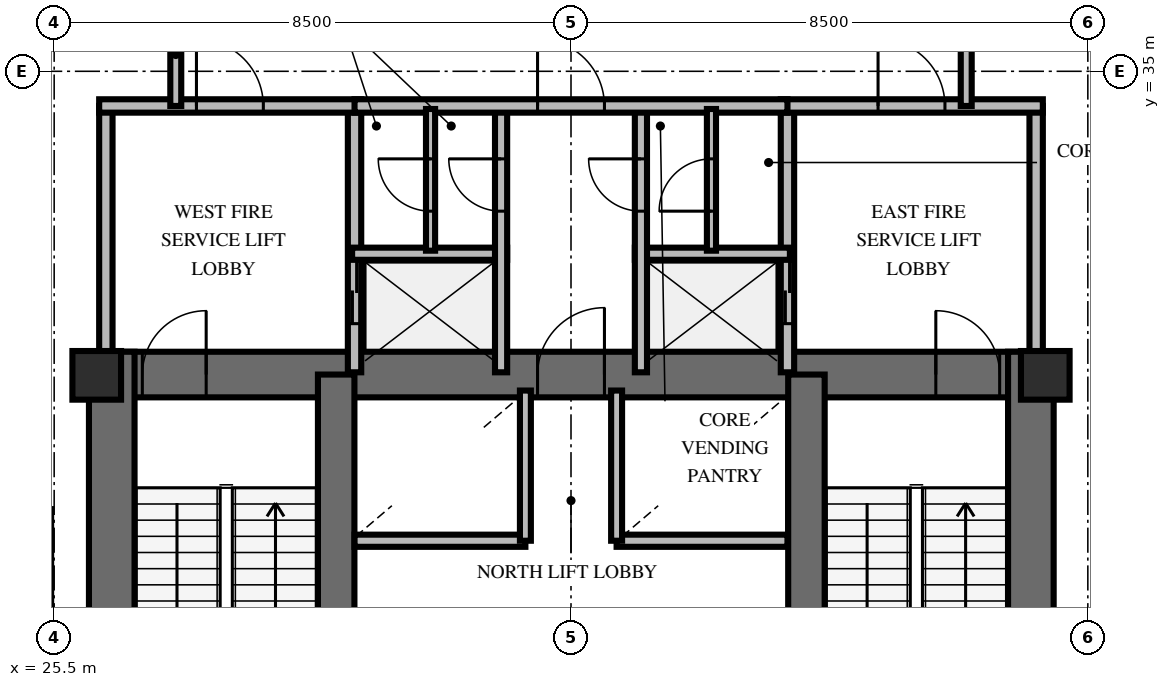
"""IFC4 building model, lengths in metres.
Left out: names, types, materials, properties, quantities, classifications, styles, units other than length and angle.
Written with IfcOpenShell. Run it as: python <this file> out.ifc"""

import sys

from ifc_helpers import new_model, si_unit, direction, frame, frame_2d, origin, origin_2d, place, context, subcontext, project, spatial, rectangle, extrude, element, fill, save


model = new_model("IFC4")
c1 = context("Model", 3, precision=1e-05, world=origin(), true_north=direction((0.0, 1.0)))
c2 = subcontext(c1, "Body", "Model", "MODEL_VIEW")
j1 = project(units=[si_unit("LENGTHUNIT", "METRE"), si_unit("PLANEANGLEUNIT", "RADIAN")], contexts=[c1])
p1 = place(None, origin())
s1 = spatial("IfcSite", under=j1, at=p1, CompositionType="ELEMENT")
p2 = place(p1, origin())
s2 = spatial("IfcBuilding", under=s1, at=p2, CompositionType="ELEMENT")
p3 = place(p2, frame((0.0, 0.0, 121.8)))
s3 = spatial("IfcBuildingStorey", under=s2, at=p3, CompositionType="ELEMENT", Elevation=121.8)
p4 = place(p3, frame((26.072, 30.013, 0.0), z_axis=(0.0, 0.0, 1.0), x_axis=(1.0, 0.0, 0.0)))
e1 = element("IfcWall", 1, at=p4, inside=s3, PredefinedType="SHEAR", context=c2, shape_type="SweptSolid", body=[
    extrude(rectangle(XDim=15.866, YDim=0.75, at=frame_2d((7.933, 0.0))), origin(), (0.0, 0.0, 1.0), 4.0),
])
p5 = place(p4, frame((0.878, 0.0, 0.0)))
e2 = element("IfcOpeningElement", 2, at=p5, cuts=e1, PredefinedType="OPENING", context=c2, shape_type="SweptSolid", body=[
    extrude(rectangle(XDim=1.05, YDim=2.15, at=frame_2d((0.525, 1.075))), frame((0.0, 0.385, 0.0), z_axis=(0.0, -1.0, 0.0), x_axis=(1.0, 0.0, 0.0)), (0.0, 0.0, 1.0), 0.77),
])
p6 = place(p4, frame((13.928, 0.0, 0.0)))
e3 = element("IfcOpeningElement", 3, at=p6, cuts=e1, PredefinedType="OPENING", context=c2, shape_type="SweptSolid", body=[
    extrude(rectangle(XDim=1.05, YDim=2.15, at=frame_2d((0.525, 1.075))), frame((0.0, 0.385, 0.0), z_axis=(0.0, -1.0, 0.0), x_axis=(1.0, 0.0, 0.0)), (0.0, 0.0, 1.0), 0.77),
])
p7 = place(p4, frame((7.378, 0.0, 0.0)))
e4 = element("IfcOpeningElement", 4, at=p7, cuts=e1, PredefinedType="OPENING", context=c2, shape_type="SweptSolid", body=[
    extrude(rectangle(XDim=1.1, YDim=2.15, at=frame_2d((0.55, 1.075))), frame((0.0, 0.385, 0.0), z_axis=(0.0, -1.0, 0.0), x_axis=(1.0, 0.0, 0.0)), (0.0, 0.0, 1.0), 0.77),
])
for number, where, z_axis, x_axis in (
    (5, (26.447, 19.812, 0.0), (0.0, 0.0, 1.0), (0.0, 1.0, 0.0)),
    (6, (41.563, 19.812, 0.0), (0.0, 0.0, 1.0), (0.0, 1.0, 0.0)),
):
    element("IfcWall", number, at=place(p3, frame(where, z_axis=z_axis, x_axis=x_axis)), inside=s3, PredefinedType="SHEAR", context=c2, shape_type="SweptSolid", body=[
        extrude(rectangle(XDim=10.576, YDim=0.75, at=frame_2d((5.288, 0.0))), origin(), (0.0, 0.0, 1.0), 4.0),
    ])
for number, where, z_axis, x_axis in (
    (7, (30.138, 20.187, 0.0), (0.0, 0.0, 1.0), (0.0, 1.0, 0.0)),
    (8, (37.872, 20.187, 0.0), (0.0, 0.0, 1.0), (0.0, 1.0, 0.0)),
):
    element("IfcWall", number, at=place(p3, frame(where, z_axis=z_axis, x_axis=x_axis)), inside=s3, PredefinedType="SHEAR", context=c2, shape_type="SweptSolid", body=[
        extrude(rectangle(XDim=9.826, YDim=0.6, at=frame_2d((4.913, 0.0))), origin(), (0.0, 0.0, 1.0), 4.0),
    ])
for number, where, z_axis, x_axis in (
    (9, (26.2, 30.0, 0.0), (0.0, 0.0, 1.0), (1.0, 0.0, 0.0)),
    (10, (41.8, 30.0, 0.0), (0.0, 0.0, 1.0), (1.0, 0.0, 0.0)),
):
    element("IfcColumn", number, at=place(p3, frame(where, z_axis=z_axis, x_axis=x_axis)), inside=s3, PredefinedType="PILASTER", context=c2, shape_type="SweptSolid", body=[
        extrude(rectangle(XDim=0.8, YDim=0.8, at=origin_2d()), origin(), (0.0, 0.0, 1.0), 4.0),
    ])
p8 = place(p3, frame((26.35, 30.05, 0.0), z_axis=(0.0, 0.0, 1.0), x_axis=(0.0, 1.0, 0.0)))
e11 = element("IfcWall", 11, at=p8, inside=s3, PredefinedType="SOLIDWALL", context=c2, shape_type="SweptSolid", body=[
    extrude(rectangle(XDim=4.38, YDim=0.22, at=frame_2d((2.19, 0.0))), origin(), (0.0, 0.0, 1.0), 2.8),
])
p9 = place(p3, frame((30.44, 30.05, 0.0), z_axis=(0.0, 0.0, 1.0), x_axis=(0.0, 1.0, 0.0)))
e12 = element("IfcWall", 12, at=p9, inside=s3, PredefinedType="SOLIDWALL", context=c2, shape_type="SweptSolid", body=[
    extrude(rectangle(XDim=4.38, YDim=0.22, at=frame_2d((2.19, 0.0))), origin(), (0.0, 0.0, 1.0), 2.8),
])
p10 = place(p9, frame((0.8, 0.0, 0.0)))
e13 = element("IfcOpeningElement", 13, at=p10, cuts=e12, PredefinedType="OPENING", context=c2, shape_type="SweptSolid", body=[
    extrude(rectangle(XDim=1.05, YDim=2.1, at=frame_2d((0.525, 1.05))), frame((0.0, 0.12, 0.0), z_axis=(0.0, -1.0, 0.0), x_axis=(1.0, 0.0, 0.0)), (0.0, 0.0, 1.0), 0.24),
])
p11 = place(p3, frame((26.24, 34.43, 0.0), z_axis=(0.0, 0.0, 1.0), x_axis=(1.0, 0.0, 0.0)))
e14 = element("IfcWall", 14, at=p11, inside=s3, PredefinedType="SOLIDWALL", context=c2, shape_type="SweptSolid", body=[
    extrude(rectangle(XDim=4.31, YDim=0.22, at=frame_2d((2.155, 0.0))), origin(), (0.0, 0.0, 1.0), 2.8),
])
p12 = place(p11, frame((1.6, 0.0, 0.0)))
e15 = element("IfcOpeningElement", 15, at=p12, cuts=e14, PredefinedType="OPENING", context=c2, shape_type="SweptSolid", body=[
    extrude(rectangle(XDim=1.1, YDim=2.15, at=frame_2d((0.55, 1.075))), frame((0.0, 0.12, 0.0), z_axis=(0.0, -1.0, 0.0), x_axis=(1.0, 0.0, 0.0)), (0.0, 0.0, 1.0), 0.24),
])
p13 = place(p3, frame((30.4, 32.0, 0.0), z_axis=(0.0, 0.0, 1.0), x_axis=(1.0, 0.0, 0.0)))
e16 = element("IfcWall", 16, at=p13, inside=s3, PredefinedType="SOLIDWALL", context=c2, shape_type="SweptSolid", body=[
    extrude(rectangle(XDim=2.55, YDim=0.2, at=frame_2d((1.275, 0.0))), origin(), (0.0, 0.0, 1.0), 2.8),
])
p14 = place(p3, frame((32.85, 30.05, 0.0), z_axis=(0.0, 0.0, 1.0), x_axis=(0.0, 1.0, 0.0)))
e17 = element("IfcWall", 17, at=p14, inside=s3, PredefinedType="SOLIDWALL", context=c2, shape_type="SweptSolid", body=[
    extrude(rectangle(XDim=4.38, YDim=0.2, at=frame_2d((2.19, 0.0))), origin(), (0.0, 0.0, 1.0), 2.8),
])
p15 = place(p14, frame((2.65, 0.0, 0.0)))
e18 = element("IfcOpeningElement", 18, at=p15, cuts=e17, PredefinedType="OPENING", context=c2, shape_type="SweptSolid", body=[
    extrude(rectangle(XDim=0.86, YDim=2.05, at=frame_2d((0.43, 1.025))), frame((0.0, 0.11, 0.0), z_axis=(0.0, -1.0, 0.0), x_axis=(1.0, 0.0, 0.0)), (0.0, 0.0, 1.0), 0.22),
])
p16 = place(p3, frame((37.56, 30.05, 0.0), z_axis=(0.0, 0.0, 1.0), x_axis=(0.0, 1.0, 0.0)))
e19 = element("IfcWall", 19, at=p16, inside=s3, PredefinedType="SOLIDWALL", context=c2, shape_type="SweptSolid", body=[
    extrude(rectangle(XDim=4.38, YDim=0.22, at=frame_2d((2.19, 0.0))), origin(), (0.0, 0.0, 1.0), 2.8),
])
p17 = place(p16, frame((0.8, 0.0, 0.0)))
e20 = element("IfcOpeningElement", 20, at=p17, cuts=e19, PredefinedType="OPENING", context=c2, shape_type="SweptSolid", body=[
    extrude(rectangle(XDim=1.05, YDim=2.1, at=frame_2d((0.525, 1.05))), frame((0.0, 0.12, 0.0), z_axis=(0.0, -1.0, 0.0), x_axis=(1.0, 0.0, 0.0)), (0.0, 0.0, 1.0), 0.24),
])
p18 = place(p3, frame((41.65, 30.05, 0.0), z_axis=(0.0, 0.0, 1.0), x_axis=(0.0, 1.0, 0.0)))
e21 = element("IfcWall", 21, at=p18, inside=s3, PredefinedType="SOLIDWALL", context=c2, shape_type="SweptSolid", body=[
    extrude(rectangle(XDim=4.38, YDim=0.22, at=frame_2d((2.19, 0.0))), origin(), (0.0, 0.0, 1.0), 2.8),
])
p19 = place(p3, frame((37.45, 34.43, 0.0), z_axis=(0.0, 0.0, 1.0), x_axis=(1.0, 0.0, 0.0)))
e22 = element("IfcWall", 22, at=p19, inside=s3, PredefinedType="SOLIDWALL", context=c2, shape_type="SweptSolid", body=[
    extrude(rectangle(XDim=4.31, YDim=0.22, at=frame_2d((2.155, 0.0))), origin(), (0.0, 0.0, 1.0), 2.8),
])
p20 = place(p19, frame((1.6, 0.0, 0.0)))
e23 = element("IfcOpeningElement", 23, at=p20, cuts=e22, PredefinedType="OPENING", context=c2, shape_type="SweptSolid", body=[
    extrude(rectangle(XDim=1.1, YDim=2.15, at=frame_2d((0.55, 1.075))), frame((0.0, 0.12, 0.0), z_axis=(0.0, -1.0, 0.0), x_axis=(1.0, 0.0, 0.0)), (0.0, 0.0, 1.0), 0.24),
])
p21 = place(p3, frame((35.05, 32.0, 0.0), z_axis=(0.0, 0.0, 1.0), x_axis=(1.0, 0.0, 0.0)))
e24 = element("IfcWall", 24, at=p21, inside=s3, PredefinedType="SOLIDWALL", context=c2, shape_type="SweptSolid", body=[
    extrude(rectangle(XDim=2.55, YDim=0.2, at=frame_2d((1.275, 0.0))), origin(), (0.0, 0.0, 1.0), 2.8),
])
p22 = place(p3, frame((35.15, 30.05, 0.0), z_axis=(0.0, 0.0, 1.0), x_axis=(0.0, 1.0, 0.0)))
e25 = element("IfcWall", 25, at=p22, inside=s3, PredefinedType="SOLIDWALL", context=c2, shape_type="SweptSolid", body=[
    extrude(rectangle(XDim=4.38, YDim=0.2, at=frame_2d((2.19, 0.0))), origin(), (0.0, 0.0, 1.0), 2.8),
])
p23 = place(p22, frame((2.65, 0.0, 0.0)))
e26 = element("IfcOpeningElement", 26, at=p23, cuts=e25, PredefinedType="OPENING", context=c2, shape_type="SweptSolid", body=[
    extrude(rectangle(XDim=0.86, YDim=2.05, at=frame_2d((0.43, 1.025))), frame((0.0, 0.11, 0.0), z_axis=(0.0, -1.0, 0.0), x_axis=(1.0, 0.0, 0.0)), (0.0, 0.0, 1.0), 0.22),
])
p24 = place(p3, frame((30.44, 34.43, 0.0), z_axis=(0.0, 0.0, 1.0), x_axis=(1.0, 0.0, 0.0)))
e27 = element("IfcWall", 27, at=p24, inside=s3, PredefinedType="SOLIDWALL", context=c2, shape_type="SweptSolid", body=[
    extrude(rectangle(XDim=7.12, YDim=0.22, at=frame_2d((3.56, 0.0))), origin(), (0.0, 0.0, 1.0), 2.8),
])
p25 = place(p24, frame((3.01, 0.0, 0.0)))
e28 = element("IfcOpeningElement", 28, at=p25, cuts=e27, PredefinedType="OPENING", context=c2, shape_type="SweptSolid", body=[
    extrude(rectangle(XDim=1.1, YDim=2.15, at=frame_2d((0.55, 1.075))), frame((0.0, 0.12, 0.0), z_axis=(0.0, -1.0, 0.0), x_axis=(1.0, 0.0, 0.0)), (0.0, 0.0, 1.0), 0.24),
])
p26 = place(p3, frame((31.69, 32.05, 0.0), z_axis=(0.0, 0.0, 1.0), x_axis=(0.0, 1.0, 0.0)))
e29 = element("IfcWall", 29, at=p26, inside=s3, PredefinedType="PARTITIONING", context=c2, shape_type="SweptSolid", body=[
    extrude(rectangle(XDim=2.33, YDim=0.15, at=frame_2d((1.165, 0.0))), origin(), (0.0, 0.0, 1.0), 2.8),
])
p27 = place(p26, frame((0.65, 0.0, 0.0)))
e30 = element("IfcOpeningElement", 30, at=p27, cuts=e29, PredefinedType="OPENING", context=c2, shape_type="SweptSolid", body=[
    extrude(rectangle(XDim=0.86, YDim=2.05, at=frame_2d((0.43, 1.025))), frame((0.0, 0.085, 0.0), z_axis=(0.0, -1.0, 0.0), x_axis=(1.0, 0.0, 0.0)), (0.0, 0.0, 1.0), 0.17),
])
p28 = place(p3, frame((36.31, 32.05, 0.0), z_axis=(0.0, 0.0, 1.0), x_axis=(0.0, 1.0, 0.0)))
e31 = element("IfcWall", 31, at=p28, inside=s3, PredefinedType="PARTITIONING", context=c2, shape_type="SweptSolid", body=[
    extrude(rectangle(XDim=2.33, YDim=0.15, at=frame_2d((1.165, 0.0))), origin(), (0.0, 0.0, 1.0), 2.8),
])
p29 = place(p28, frame((0.65, 0.0, 0.0)))
e32 = element("IfcOpeningElement", 32, at=p29, cuts=e31, PredefinedType="OPENING", context=c2, shape_type="SweptSolid", body=[
    extrude(rectangle(XDim=0.86, YDim=2.05, at=frame_2d((0.43, 1.025))), frame((0.0, 0.085, 0.0), z_axis=(0.0, -1.0, 0.0), x_axis=(1.0, 0.0, 0.0)), (0.0, 0.0, 1.0), 0.17),
])
p30 = place(p3, frame((30.44, 27.28, 0.0), z_axis=(0.0, 0.0, 1.0), x_axis=(1.0, 0.0, 0.0)))
e33 = element("IfcWall", 33, at=p30, inside=s3, PredefinedType="SOLIDWALL", context=c2, shape_type="SweptSolid", body=[
    extrude(rectangle(XDim=2.81, YDim=0.2, at=frame_2d((1.405, 0.0))), origin(), (0.0, 0.0, 1.0), 2.8),
])
p31 = place(p3, frame((33.25, 27.28, 0.0), z_axis=(0.0, 0.0, 1.0), x_axis=(0.0, 1.0, 0.0)))
e34 = element("IfcWall", 34, at=p31, inside=s3, PredefinedType="SOLIDWALL", context=c2, shape_type="SweptSolid", body=[
    extrude(rectangle(XDim=2.47, YDim=0.18, at=frame_2d((1.235, 0.0))), origin(), (0.0, 0.0, 1.0), 2.8),
])
p32 = place(p3, frame((34.75, 27.28, 0.0), z_axis=(0.0, 0.0, 1.0), x_axis=(1.0, 0.0, 0.0)))
e35 = element("IfcWall", 35, at=p32, inside=s3, PredefinedType="SOLIDWALL", context=c2, shape_type="SweptSolid", body=[
    extrude(rectangle(XDim=2.81, YDim=0.2, at=frame_2d((1.405, 0.0))), origin(), (0.0, 0.0, 1.0), 2.8),
])
p33 = place(p3, frame((34.75, 27.28, 0.0), z_axis=(0.0, 0.0, 1.0), x_axis=(0.0, 1.0, 0.0)))
e36 = element("IfcWall", 36, at=p33, inside=s3, PredefinedType="SOLIDWALL", context=c2, shape_type="SweptSolid", body=[
    extrude(rectangle(XDim=2.47, YDim=0.18, at=frame_2d((1.235, 0.0))), origin(), (0.0, 0.0, 1.0), 2.8),
])
for number, where, z_axis, x_axis in (
    (37, (27.5, 34.43, 0.0), (0.0, 0.0, 1.0), (0.0, 1.0, 0.0)),
    (38, (40.5, 36.123, 0.0), (0.0, 0.0, 1.0), (0.0, -1.0, 0.0)),
):
    element("IfcWall", number, at=place(p3, frame(where, z_axis=z_axis, x_axis=x_axis)), inside=s3, PredefinedType="PARTITIONING", context=c2, shape_type="SweptSolid", body=[
        extrude(rectangle(XDim=1.693, YDim=0.18, at=frame_2d((0.846, 0.0))), origin(), (0.0, 0.0, 1.0), 2.8),
    ])
p34 = place(p3, frame((44.521, 35.114, 0.0), z_axis=(0.0, 0.0, 1.0), x_axis=(-0.776056841092, 0.630662968149, 0.0)))
e39 = element("IfcWall", 39, at=p34, inside=s3, PredefinedType="PARTITIONING", context=c2, shape_type="SweptSolid", body=[
    extrude(rectangle(XDim=4.834, YDim=0.18, at=frame_2d((2.417, 0.0))), origin(), (0.0, 0.0, 1.0), 2.8),
])
p35 = place(p34, frame((1.034, 0.0, 0.0)))
e40 = element("IfcOpeningElement", 40, at=p35, cuts=e39, PredefinedType="OPENING", context=c2, shape_type="SweptSolid", body=[
    extrude(rectangle(XDim=1.0, YDim=2.15, at=frame_2d((0.5, 1.075))), frame((0.0, 0.1, 0.0), z_axis=(0.0, -1.0, 0.0), x_axis=(1.0, 0.0, 0.0)), (0.0, 0.0, 1.0), 0.2),
])
p36 = place(p3, frame((26.852, 37.944, 0.0), z_axis=(0.0, 0.0, 1.0), x_axis=(-0.755849022926, -0.654745946564, 0.0)))
e41 = element("IfcWall", 41, at=p36, inside=s3, PredefinedType="PARTITIONING", context=c2, shape_type="SweptSolid", body=[
    extrude(rectangle(XDim=4.834, YDim=0.18, at=frame_2d((2.417, 0.0))), origin(), (0.0, 0.0, 1.0), 2.8),
])
p37 = place(p36, frame((2.801, 0.0, 0.0)))
e42 = element("IfcOpeningElement", 42, at=p37, cuts=e41, PredefinedType="OPENING", context=c2, shape_type="SweptSolid", body=[
    extrude(rectangle(XDim=1.0, YDim=2.15, at=frame_2d((0.5, 1.075))), frame((0.0, 0.1, 0.0), z_axis=(0.0, -1.0, 0.0), x_axis=(1.0, 0.0, 0.0)), (0.0, 0.0, 1.0), 0.2),
])
p38 = place(p5, origin())
e43 = element("IfcDoor", 43, at=p38, inside=s3, OperationType="SINGLE_SWING_RIGHT", PredefinedType="DOOR", context=c2, shape_type="SweptSolid", body=[
    extrude(rectangle(XDim=1.05, YDim=2.15, at=frame_2d((0.525, 1.075))), frame((0.0, 0.025, 0.0), z_axis=(0.0, -1.0, 0.0), x_axis=(1.0, 0.0, 0.0)), (0.0, 0.0, 1.0), 0.05),
])
fill(e2, e43)
p39 = place(p6, origin())
e44 = element("IfcDoor", 44, at=p39, inside=s3, OperationType="SINGLE_SWING_LEFT", PredefinedType="DOOR", context=c2, shape_type="SweptSolid", body=[
    extrude(rectangle(XDim=1.05, YDim=2.15, at=frame_2d((0.525, 1.075))), frame((0.0, 0.025, 0.0), z_axis=(0.0, -1.0, 0.0), x_axis=(1.0, 0.0, 0.0)), (0.0, 0.0, 1.0), 0.05),
])
fill(e3, e44)
p40 = place(p7, origin())
e45 = element("IfcDoor", 45, at=p40, inside=s3, OperationType="SINGLE_SWING_RIGHT", PredefinedType="DOOR", context=c2, shape_type="SweptSolid", body=[
    extrude(rectangle(XDim=1.1, YDim=2.15, at=frame_2d((0.55, 1.075))), frame((0.0, 0.025, 0.0), z_axis=(0.0, -1.0, 0.0), x_axis=(1.0, 0.0, 0.0)), (0.0, 0.0, 1.0), 0.05),
])
fill(e4, e45)
p41 = place(p12, origin())
e46 = element("IfcDoor", 46, at=p41, inside=s3, OperationType="SINGLE_SWING_LEFT", PredefinedType="DOOR", context=c2, shape_type="SweptSolid", body=[
    extrude(rectangle(XDim=1.1, YDim=2.15, at=frame_2d((0.55, 1.075))), frame((0.0, 0.025, 0.0), z_axis=(0.0, -1.0, 0.0), x_axis=(1.0, 0.0, 0.0)), (0.0, 0.0, 1.0), 0.05),
])
fill(e15, e46)
p42 = place(p10, origin())
e47 = element("IfcDoor", 47, at=p42, inside=s3, OperationType="DOUBLE_DOOR_SLIDING", PredefinedType="USERDEFINED", context=c2, shape_type="SweptSolid", body=[
    extrude(rectangle(XDim=1.05, YDim=2.1, at=frame_2d((0.525, 1.05))), frame((0.0, 0.025, 0.0), z_axis=(0.0, -1.0, 0.0), x_axis=(1.0, 0.0, 0.0)), (0.0, 0.0, 1.0), 0.05),
])
fill(e13, e47)
p43 = place(p15, origin())
e48 = element("IfcDoor", 48, at=p43, inside=s3, OperationType="SINGLE_SWING_RIGHT", PredefinedType="TRAPDOOR", context=c2, shape_type="SweptSolid", body=[
    extrude(rectangle(XDim=0.86, YDim=2.05, at=frame_2d((0.43, 1.025))), frame((0.0, 0.025, 0.0), z_axis=(0.0, -1.0, 0.0), x_axis=(1.0, 0.0, 0.0)), (0.0, 0.0, 1.0), 0.05),
])
fill(e18, e48)
p44 = place(p20, origin())
e49 = element("IfcDoor", 49, at=p44, inside=s3, OperationType="SINGLE_SWING_LEFT", PredefinedType="DOOR", context=c2, shape_type="SweptSolid", body=[
    extrude(rectangle(XDim=1.1, YDim=2.15, at=frame_2d((0.55, 1.075))), frame((0.0, 0.025, 0.0), z_axis=(0.0, -1.0, 0.0), x_axis=(1.0, 0.0, 0.0)), (0.0, 0.0, 1.0), 0.05),
])
fill(e23, e49)
p45 = place(p17, origin())
e50 = element("IfcDoor", 50, at=p45, inside=s3, OperationType="DOUBLE_DOOR_SLIDING", PredefinedType="USERDEFINED", context=c2, shape_type="SweptSolid", body=[
    extrude(rectangle(XDim=1.05, YDim=2.1, at=frame_2d((0.525, 1.05))), frame((0.0, 0.025, 0.0), z_axis=(0.0, -1.0, 0.0), x_axis=(1.0, 0.0, 0.0)), (0.0, 0.0, 1.0), 0.05),
])
fill(e20, e50)
p46 = place(p23, origin())
e51 = element("IfcDoor", 51, at=p46, inside=s3, OperationType="SINGLE_SWING_RIGHT", PredefinedType="TRAPDOOR", context=c2, shape_type="SweptSolid", body=[
    extrude(rectangle(XDim=0.86, YDim=2.05, at=frame_2d((0.43, 1.025))), frame((0.0, 0.025, 0.0), z_axis=(0.0, -1.0, 0.0), x_axis=(1.0, 0.0, 0.0)), (0.0, 0.0, 1.0), 0.05),
])
fill(e26, e51)
p47 = place(p25, origin())
e52 = element("IfcDoor", 52, at=p47, inside=s3, OperationType="SINGLE_SWING_LEFT", PredefinedType="DOOR", context=c2, shape_type="SweptSolid", body=[
    extrude(rectangle(XDim=1.1, YDim=2.15, at=frame_2d((0.55, 1.075))), frame((0.0, 0.025, 0.0), z_axis=(0.0, -1.0, 0.0), x_axis=(1.0, 0.0, 0.0)), (0.0, 0.0, 1.0), 0.05),
])
fill(e28, e52)
p48 = place(p27, origin())
e53 = element("IfcDoor", 53, at=p48, inside=s3, OperationType="SINGLE_SWING_RIGHT", PredefinedType="TRAPDOOR", context=c2, shape_type="SweptSolid", body=[
    extrude(rectangle(XDim=0.86, YDim=2.05, at=frame_2d((0.43, 1.025))), frame((0.0, 0.025, 0.0), z_axis=(0.0, -1.0, 0.0), x_axis=(1.0, 0.0, 0.0)), (0.0, 0.0, 1.0), 0.05),
])
fill(e30, e53)
p49 = place(p29, origin())
e54 = element("IfcDoor", 54, at=p49, inside=s3, OperationType="SINGLE_SWING_LEFT", PredefinedType="TRAPDOOR", context=c2, shape_type="SweptSolid", body=[
    extrude(rectangle(XDim=0.86, YDim=2.05, at=frame_2d((0.43, 1.025))), frame((0.0, 0.025, 0.0), z_axis=(0.0, -1.0, 0.0), x_axis=(1.0, 0.0, 0.0)), (0.0, 0.0, 1.0), 0.05),
])
fill(e32, e54)
save(model, sys.argv[1])
